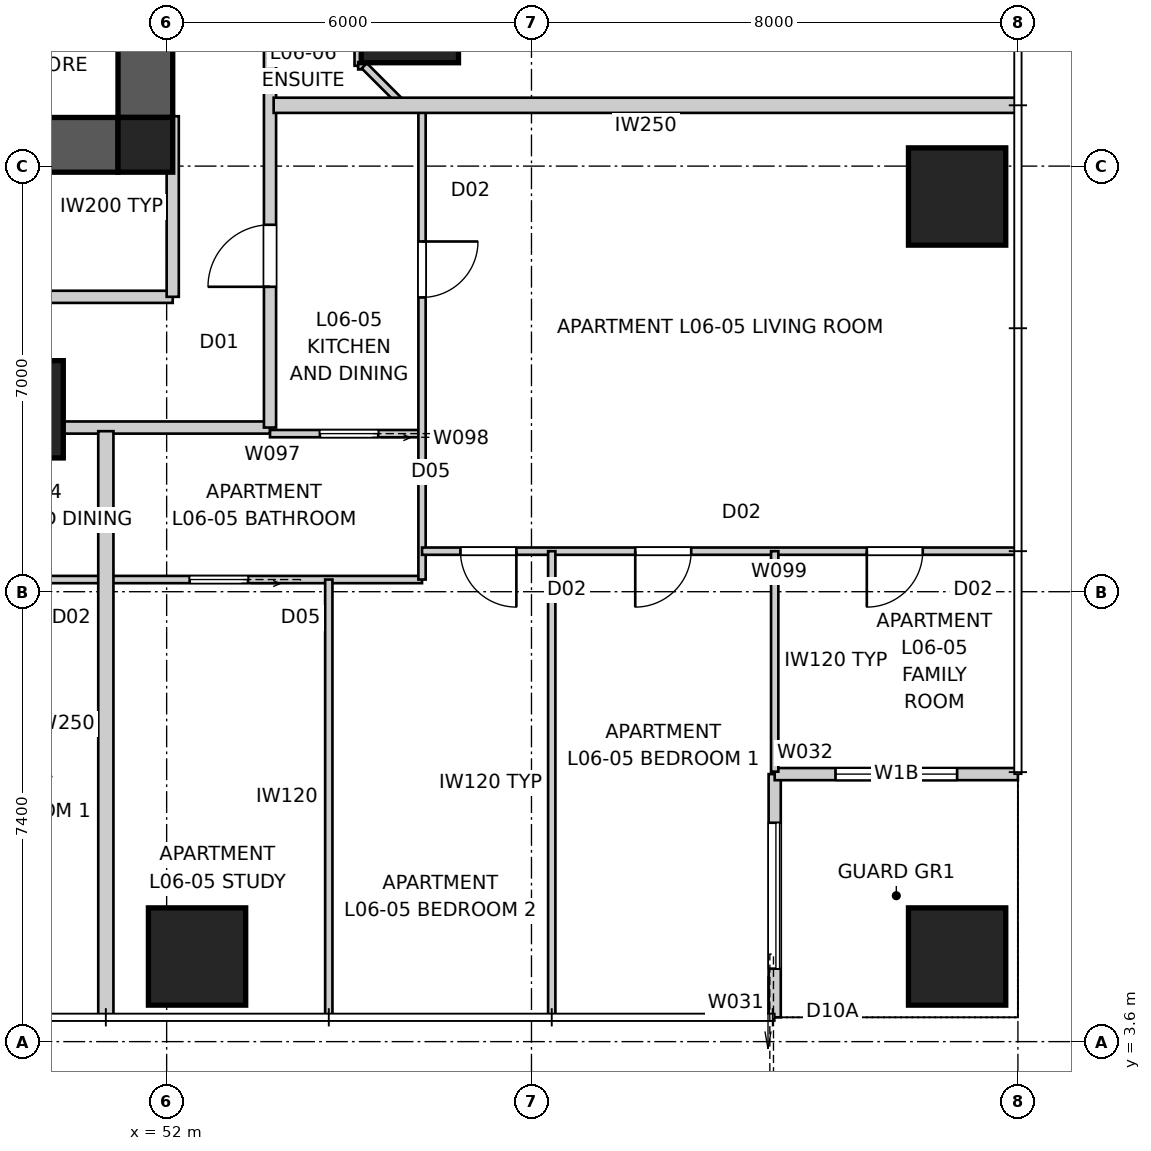
"""IFC4 building model, lengths in metres.
Left out: names, types, materials, properties, quantities, classifications, styles, units other than length and angle.
Written with IfcOpenShell. Run it as: python <this file> out.ifc"""

import sys

from ifc_helpers import new_model, si_unit, direction, frame, frame_2d, origin, origin_2d, place, context, subcontext, project, spatial, polyline, rectangle, outline, extrude, element, fill, save


model = new_model("IFC4")
c1 = context("Model", 3, precision=1e-05, world=origin(), true_north=direction((0.0, 1.0)))
c2 = subcontext(c1, "Body", "Model", "MODEL_VIEW")
j1 = project(units=[si_unit("LENGTHUNIT", "METRE"), si_unit("PLANEANGLEUNIT", "RADIAN")], contexts=[c1])
p1 = place(None, origin())
s1 = spatial("IfcSite", under=j1, at=p1, CompositionType="ELEMENT")
p2 = place(p1, origin())
s2 = spatial("IfcBuilding", under=s1, at=p2, CompositionType="ELEMENT")
p3 = place(p2, frame((0.0, 0.0, 25.2)))
s3 = spatial("IfcBuildingStorey", under=s2, at=p3, CompositionType="ELEMENT", Elevation=25.2)
p4 = place(p3, frame((51.2, 18.35, 0.0), z_axis=(0.0, 0.0, 1.0), x_axis=(-1.0, 0.0, 0.0)))
e1 = element("IfcWall", 1, at=p4, inside=s3, PredefinedType="SHEAR", context=c2, shape_type="SweptSolid", body=[
    extrude(outline(polyline([(0.0, -0.45), (22.4, -0.45), (22.4, -0.025), (22.85, -0.025), (22.85, 0.025), (22.4, 0.025), (22.4, 0.45), (0.0, 0.45), (0.0, 0.025), (-0.45, 0.025), (-0.45, -0.025), (0.0, -0.025), (0.0, -0.45)])), origin(), (0.0, 0.0, 1.0), 3.4),
])
p5 = place(p3, frame((51.65, 18.8, 0.0), z_axis=(0.0, 0.0, 1.0), x_axis=(0.0, 1.0, 0.0)))
e2 = element("IfcWall", 2, at=p5, inside=s3, PredefinedType="SHEAR", context=c2, shape_type="SweptSolid", body=[
    extrude(outline(polyline([(0.0, -0.45), (22.4, -0.45), (22.4, -0.025), (22.85, -0.025), (22.85, 0.025), (22.4, 0.025), (22.4, 0.45), (0.0, 0.45), (0.0, 0.025), (-0.45, 0.025), (-0.45, -0.025), (0.0, -0.025), (0.0, -0.45)])), origin(), (0.0, 0.0, 1.0), 3.4),
])
p6 = place(p5, frame((11.14, 0.0, 0.0)))
e3 = element("IfcOpeningElement", 3, at=p6, cuts=e2, PredefinedType="OPENING", context=c2, shape_type="SweptSolid", body=[
    extrude(rectangle(XDim=1.02, YDim=2.4, at=frame_2d((0.51, 1.2))), frame((0.0, 0.46, 0.0), z_axis=(0.0, -1.0, 0.0), x_axis=(1.0, 0.0, 0.0)), (0.0, 0.0, 1.0), 0.92),
])
p7 = place(p3, frame((51.65, 18.35, 0.0), z_axis=(0.0, 0.0, 1.0), x_axis=(1.0, 0.0, 0.0)))
e4 = element("IfcColumn", 4, at=p7, inside=s3, PredefinedType="COLUMN", context=c2, shape_type="SweptSolid", body=[
    extrude(rectangle(XDim=0.9, YDim=0.9, at=origin_2d()), origin(), (0.0, 0.0, 1.0), 3.4),
])
for number, where, z_axis, x_axis in (
    (5, (52.5, 5.0, 0.0), (0.0, 0.0, 1.0), (1.0, 0.0, 0.0)),
    (6, (65.0, 5.0, 0.0), (0.0, 0.0, 1.0), (1.0, 0.0, 0.0)),
    (7, (65.0, 17.5, 0.0), (0.0, 0.0, 1.0), (1.0, 0.0, 0.0)),
    (8, (49.5, 14.0, 0.0), (0.0, 0.0, 1.0), (1.0, 0.0, 0.0)),
    (9, (56.0, 20.5, 0.0), (0.0, 0.0, 1.0), (1.0, 0.0, 0.0)),
):
    element("IfcColumn", number, at=place(p3, frame(where, z_axis=z_axis, x_axis=x_axis)), inside=s3, PredefinedType="COLUMN", context=c2, shape_type="SweptSolid", body=[
        extrude(rectangle(XDim=1.6, YDim=1.6, at=origin_2d()), origin(), (0.0, 0.0, 1.0), 3.4),
    ])
p8 = place(p3, frame((62.0, 4.0, 0.0), z_axis=(0.0, 0.0, 1.0), x_axis=(0.0, 1.0, 0.0)))
e10 = element("IfcWall", 10, at=p8, inside=s3, PredefinedType="SOLIDWALL", context=c2, shape_type="SweptSolid", body=[
    extrude(rectangle(XDim=4.0, YDim=0.2, at=frame_2d((2.0, 0.0))), origin(), (0.0, 0.0, 1.0), 3.25),
])
p9 = place(p8, frame((0.8, 0.0, 0.0)))
e11 = element("IfcOpeningElement", 11, at=p9, cuts=e10, PredefinedType="OPENING", context=c2, shape_type="SweptSolid", body=[
    extrude(rectangle(XDim=2.4, YDim=2.1, at=frame_2d((1.2, 1.05))), frame((0.0, 0.11, 0.0), z_axis=(0.0, -1.0, 0.0), x_axis=(1.0, 0.0, 0.0)), (0.0, 0.0, 1.0), 0.22),
])
p10 = place(p3, frame((62.0, 8.0, 0.0), z_axis=(0.0, 0.0, 1.0), x_axis=(1.0, 0.0, 0.0)))
e12 = element("IfcWall", 12, at=p10, inside=s3, PredefinedType="SOLIDWALL", context=c2, shape_type="SweptSolid", body=[
    extrude(rectangle(XDim=4.0, YDim=0.2, at=frame_2d((2.0, 0.0))), origin(), (0.0, 0.0, 1.0), 3.25),
])
p11 = place(p10, frame((1.0, 0.0, 0.45)))
e13 = element("IfcOpeningElement", 13, at=p11, cuts=e12, PredefinedType="OPENING", context=c2, shape_type="SweptSolid", body=[
    extrude(rectangle(XDim=2.0, YDim=1.8, at=frame_2d((1.0, 0.9))), frame((0.0, 0.11, 0.0), z_axis=(0.0, -1.0, 0.0), x_axis=(1.0, 0.0, 0.0)), (0.0, 0.0, 1.0), 0.22),
])
p12 = place(p3, frame((49.242, 13.7, 0.0), z_axis=(0.0, 0.0, 1.0), x_axis=(1.0, 0.0, 0.0)))
e14 = element("IfcWall", 14, at=p12, inside=s3, PredefinedType="PARTITIONING", context=c2, shape_type="SweptSolid", body=[
    extrude(rectangle(XDim=4.458, YDim=0.2, at=frame_2d((2.229, 0.0))), origin(), (0.0, 0.0, 1.0), 3.25),
])
p13 = place(p3, frame((53.7, 13.7, 0.0), z_axis=(0.0, 0.0, 1.0), x_axis=(0.0, 1.0, 0.0)))
e15 = element("IfcWall", 15, at=p13, inside=s3, PredefinedType="PARTITIONING", context=c2, shape_type="SweptSolid", body=[
    extrude(rectangle(XDim=32.6, YDim=0.2, at=frame_2d((16.3, 0.0))), origin(), (0.0, 0.0, 1.0), 3.25),
])
p14 = place(p13, frame((2.315, 0.0, 0.0)))
e16 = element("IfcOpeningElement", 16, at=p14, cuts=e15, PredefinedType="OPENING", context=c2, shape_type="SweptSolid", body=[
    extrude(rectangle(XDim=1.02, YDim=2.34, at=frame_2d((0.51, 1.17))), frame((0.0, 0.11, 0.0), z_axis=(0.0, -1.0, 0.0), x_axis=(1.0, 0.0, 0.0)), (0.0, 0.0, 1.0), 0.22),
])
p15 = place(p13, frame((29.265, 0.0, 0.0)))
e17 = element("IfcOpeningElement", 17, at=p15, cuts=e15, PredefinedType="OPENING", context=c2, shape_type="SweptSolid", body=[
    extrude(rectangle(XDim=1.02, YDim=2.34, at=frame_2d((0.51, 1.17))), frame((0.0, 0.11, 0.0), z_axis=(0.0, -1.0, 0.0), x_axis=(1.0, 0.0, 0.0)), (0.0, 0.0, 1.0), 0.22),
])
p16 = place(p13, frame((20.646, 0.0, 0.0)))
e18 = element("IfcOpeningElement", 18, at=p16, cuts=e15, PredefinedType="OPENING", context=c2, shape_type="SweptSolid", body=[
    extrude(rectangle(XDim=1.02, YDim=2.34, at=frame_2d((0.51, 1.17))), frame((0.0, 0.11, 0.0), z_axis=(0.0, -1.0, 0.0), x_axis=(1.0, 0.0, 0.0)), (0.0, 0.0, 1.0), 0.22),
])
p17 = place(p13, frame((13.626, 0.0, 0.0)))
e19 = element("IfcOpeningElement", 19, at=p17, cuts=e15, PredefinedType="OPENING", context=c2, shape_type="SweptSolid", body=[
    extrude(rectangle(XDim=1.02, YDim=2.34, at=frame_2d((0.51, 1.17))), frame((0.0, 0.11, 0.0), z_axis=(0.0, -1.0, 0.0), x_axis=(1.0, 0.0, 0.0)), (0.0, 0.0, 1.0), 0.22),
])
p18 = place(p3, frame((51.0, 4.0, 0.0), z_axis=(0.0, 0.0, 1.0), x_axis=(0.0, 1.0, 0.0)))
e20 = element("IfcWall", 20, at=p18, inside=s3, PredefinedType="PARTITIONING", context=c2, shape_type="SweptSolid", body=[
    extrude(rectangle(XDim=9.64, YDim=0.25, at=frame_2d((4.82, 0.0))), origin(), (0.0, 0.0, 1.0), 3.25),
])
p19 = place(p3, frame((66.0, 19.0, 0.0), z_axis=(0.0, 0.0, 1.0), x_axis=(-1.0, 0.0, 0.0)))
e21 = element("IfcWall", 21, at=p19, inside=s3, PredefinedType="PARTITIONING", context=c2, shape_type="SweptSolid", body=[
    extrude(rectangle(XDim=12.24, YDim=0.25, at=frame_2d((6.12, 0.0))), origin(), (0.0, 0.0, 1.0), 3.25),
])
p20 = place(p3, frame((27.9, 15.85, 0.0), z_axis=(0.0, 0.0, 1.0), x_axis=(1.0, 0.0, 0.0)))
e22 = element("IfcWall", 22, at=p20, inside=s3, PredefinedType="PARTITIONING", context=c2, shape_type="SweptSolid", body=[
    extrude(rectangle(XDim=24.2, YDim=0.2, at=frame_2d((12.1, 0.0))), origin(), (0.0, 0.0, 1.0), 3.25),
])
p21 = place(p20, frame((12.437, 0.0, 0.0)))
e23 = element("IfcOpeningElement", 23, at=p21, cuts=e22, PredefinedType="OPENING", context=c2, shape_type="SweptSolid", body=[
    extrude(rectangle(XDim=1.02, YDim=2.1, at=frame_2d((0.51, 1.05))), frame((0.0, 0.11, 0.0), z_axis=(0.0, -1.0, 0.0), x_axis=(1.0, 0.0, 0.0)), (0.0, 0.0, 1.0), 0.22),
])
p22 = place(p20, frame((3.544, 0.0, 0.0)))
e24 = element("IfcOpeningElement", 24, at=p22, cuts=e22, PredefinedType="OPENING", context=c2, shape_type="SweptSolid", body=[
    extrude(rectangle(XDim=1.02, YDim=2.1, at=frame_2d((0.51, 1.05))), frame((0.0, 0.11, 0.0), z_axis=(0.0, -1.0, 0.0), x_axis=(1.0, 0.0, 0.0)), (0.0, 0.0, 1.0), 0.22),
])
p23 = place(p20, frame((19.733, 0.0, 0.0)))
e25 = element("IfcOpeningElement", 25, at=p23, cuts=e22, PredefinedType="OPENING", context=c2, shape_type="SweptSolid", body=[
    extrude(rectangle(XDim=1.02, YDim=2.1, at=frame_2d((0.51, 1.05))), frame((0.0, 0.11, 0.0), z_axis=(0.0, -1.0, 0.0), x_axis=(1.0, 0.0, 0.0)), (0.0, 0.0, 1.0), 0.22),
])
p24 = place(p3, frame((52.1, 15.85, 0.0), z_axis=(0.0, 0.0, 1.0), x_axis=(0.0, 1.0, 0.0)))
e26 = element("IfcWall", 26, at=p24, inside=s3, PredefinedType="PARTITIONING", context=c2, shape_type="SweptSolid", body=[
    extrude(rectangle(XDim=2.97, YDim=0.2, at=frame_2d((1.485, 0.0))), origin(), (0.0, 0.0, 1.0), 3.25),
])
p25 = place(p3, frame((56.2, 11.2, 0.0), z_axis=(0.0, 0.0, 1.0), x_axis=(-1.0, 0.0, 0.0)))
e27 = element("IfcWall", 27, at=p25, inside=s3, PredefinedType="PARTITIONING", context=c2, shape_type="SweptSolid", body=[
    extrude(rectangle(XDim=32.4, YDim=0.12, at=frame_2d((16.2, 0.0))), origin(), (0.0, 0.0, 1.0), 3.25),
])
p26 = place(p25, frame((24.882, 0.0, 0.0)))
e28 = element("IfcOpeningElement", 28, at=p26, cuts=e27, PredefinedType="OPENING", context=c2, shape_type="SweptSolid", body=[
    extrude(rectangle(XDim=0.92, YDim=2.34, at=frame_2d((0.46, 1.17))), frame((0.0, 0.07, 0.0), z_axis=(0.0, -1.0, 0.0), x_axis=(1.0, 0.0, 0.0)), (0.0, 0.0, 1.0), 0.14),
])
p27 = place(p25, frame((22.477, 0.0, 0.0)))
e29 = element("IfcOpeningElement", 29, at=p27, cuts=e27, PredefinedType="OPENING", context=c2, shape_type="SweptSolid", body=[
    extrude(rectangle(XDim=0.92, YDim=2.34, at=frame_2d((0.46, 1.17))), frame((0.0, 0.07, 0.0), z_axis=(0.0, -1.0, 0.0), x_axis=(1.0, 0.0, 0.0)), (0.0, 0.0, 1.0), 0.14),
])
p28 = place(p25, frame((6.598, 0.0, 0.0)))
e30 = element("IfcOpeningElement", 30, at=p28, cuts=e27, PredefinedType="OPENING", context=c2, shape_type="SweptSolid", body=[
    extrude(rectangle(XDim=0.92, YDim=2.34, at=frame_2d((0.46, 1.17))), frame((0.0, 0.07, 0.0), z_axis=(0.0, -1.0, 0.0), x_axis=(1.0, 0.0, 0.0)), (0.0, 0.0, 1.0), 0.14),
])
p29 = place(p25, frame((28.598, 0.0, 0.0)))
e31 = element("IfcOpeningElement", 31, at=p29, cuts=e27, PredefinedType="OPENING", context=c2, shape_type="SweptSolid", body=[
    extrude(rectangle(XDim=0.92, YDim=2.34, at=frame_2d((0.46, 1.17))), frame((0.0, 0.07, 0.0), z_axis=(0.0, -1.0, 0.0), x_axis=(1.0, 0.0, 0.0)), (0.0, 0.0, 1.0), 0.14),
])
p30 = place(p25, frame((2.862, 0.0, 0.0)))
e32 = element("IfcOpeningElement", 32, at=p30, cuts=e27, PredefinedType="OPENING", context=c2, shape_type="SweptSolid", body=[
    extrude(rectangle(XDim=0.96, YDim=2.1, at=frame_2d((0.48, 1.05))), frame((0.0, 0.07, 0.0), z_axis=(0.0, -1.0, 0.0), x_axis=(1.0, 0.0, 0.0)), (0.0, 0.0, 1.0), 0.14),
])
p31 = place(p25, frame((10.363, 0.0, 0.0)))
e33 = element("IfcOpeningElement", 33, at=p31, cuts=e27, PredefinedType="OPENING", context=c2, shape_type="SweptSolid", body=[
    extrude(rectangle(XDim=0.96, YDim=2.1, at=frame_2d((0.48, 1.05))), frame((0.0, 0.07, 0.0), z_axis=(0.0, -1.0, 0.0), x_axis=(1.0, 0.0, 0.0)), (0.0, 0.0, 1.0), 0.14),
])
p32 = place(p25, frame((13.862, 0.0, 0.0)))
e34 = element("IfcOpeningElement", 34, at=p32, cuts=e27, PredefinedType="OPENING", context=c2, shape_type="SweptSolid", body=[
    extrude(rectangle(XDim=0.96, YDim=2.1, at=frame_2d((0.48, 1.05))), frame((0.0, 0.07, 0.0), z_axis=(0.0, -1.0, 0.0), x_axis=(1.0, 0.0, 0.0)), (0.0, 0.0, 1.0), 0.14),
])
p33 = place(p25, frame((17.529, 0.0, 0.0)))
e35 = element("IfcOpeningElement", 35, at=p33, cuts=e27, PredefinedType="OPENING", context=c2, shape_type="SweptSolid", body=[
    extrude(rectangle(XDim=0.96, YDim=2.1, at=frame_2d((0.48, 1.05))), frame((0.0, 0.07, 0.0), z_axis=(0.0, -1.0, 0.0), x_axis=(1.0, 0.0, 0.0)), (0.0, 0.0, 1.0), 0.14),
])
p34 = place(p3, frame((56.2, 13.6, 0.0), z_axis=(0.0, 0.0, 1.0), x_axis=(-1.0, 0.0, 0.0)))
e36 = element("IfcWall", 36, at=p34, inside=s3, PredefinedType="PARTITIONING", context=c2, shape_type="SweptSolid", body=[
    extrude(rectangle(XDim=2.5, YDim=0.12, at=frame_2d((1.25, 0.0))), origin(), (0.0, 0.0, 1.0), 3.25),
])
p35 = place(p34, frame((0.72, 0.0, 0.0)))
e37 = element("IfcOpeningElement", 37, at=p35, cuts=e36, PredefinedType="OPENING", context=c2, shape_type="SweptSolid", body=[
    extrude(rectangle(XDim=0.96, YDim=2.1, at=frame_2d((0.48, 1.05))), frame((0.0, 0.07, 0.0), z_axis=(0.0, -1.0, 0.0), x_axis=(1.0, 0.0, 0.0)), (0.0, 0.0, 1.0), 0.14),
])
p36 = place(p3, frame((56.2, 19.0, 0.0), z_axis=(0.0, 0.0, 1.0), x_axis=(0.0, -1.0, 0.0)))
e38 = element("IfcWall", 38, at=p36, inside=s3, PredefinedType="PARTITIONING", context=c2, shape_type="SweptSolid", body=[
    extrude(rectangle(XDim=7.8, YDim=0.12, at=frame_2d((3.9, 0.0))), origin(), (0.0, 0.0, 1.0), 3.25),
])
p37 = place(p36, frame((2.24, 0.0, 0.0)))
e39 = element("IfcOpeningElement", 39, at=p37, cuts=e38, PredefinedType="OPENING", context=c2, shape_type="SweptSolid", body=[
    extrude(rectangle(XDim=0.92, YDim=2.34, at=frame_2d((0.46, 1.17))), frame((0.0, 0.07, 0.0), z_axis=(0.0, -1.0, 0.0), x_axis=(1.0, 0.0, 0.0)), (0.0, 0.0, 1.0), 0.14),
])
p38 = place(p3, frame((65.96, 11.667, 0.0), z_axis=(0.0, 0.0, 1.0), x_axis=(-1.0, 0.0, 0.0)))
e40 = element("IfcWall", 40, at=p38, inside=s3, PredefinedType="PARTITIONING", context=c2, shape_type="SweptSolid", body=[
    extrude(rectangle(XDim=9.76, YDim=0.12, at=frame_2d((4.88, 0.0))), origin(), (0.0, 0.0, 1.0), 3.25),
])
p39 = place(p38, frame((1.525, 0.0, 0.0)))
e41 = element("IfcOpeningElement", 41, at=p39, cuts=e40, PredefinedType="OPENING", context=c2, shape_type="SweptSolid", body=[
    extrude(rectangle(XDim=0.92, YDim=2.34, at=frame_2d((0.46, 1.17))), frame((0.0, 0.07, 0.0), z_axis=(0.0, -1.0, 0.0), x_axis=(1.0, 0.0, 0.0)), (0.0, 0.0, 1.0), 0.14),
])
p40 = place(p38, frame((5.333, 0.0, 0.0)))
e42 = element("IfcOpeningElement", 42, at=p40, cuts=e40, PredefinedType="OPENING", context=c2, shape_type="SweptSolid", body=[
    extrude(rectangle(XDim=0.92, YDim=2.34, at=frame_2d((0.46, 1.17))), frame((0.0, 0.07, 0.0), z_axis=(0.0, -1.0, 0.0), x_axis=(1.0, 0.0, 0.0)), (0.0, 0.0, 1.0), 0.14),
])
p41 = place(p38, frame((8.208, 0.0, 0.0)))
e43 = element("IfcOpeningElement", 43, at=p41, cuts=e40, PredefinedType="OPENING", context=c2, shape_type="SweptSolid", body=[
    extrude(rectangle(XDim=0.92, YDim=2.34, at=frame_2d((0.46, 1.17))), frame((0.0, 0.07, 0.0), z_axis=(0.0, -1.0, 0.0), x_axis=(1.0, 0.0, 0.0)), (0.0, 0.0, 1.0), 0.14),
])
p42 = place(p3, frame((58.333, 4.04, 0.0), z_axis=(0.0, 0.0, 1.0), x_axis=(0.0, 1.0, 0.0)))
e44 = element("IfcWall", 44, at=p42, inside=s3, PredefinedType="PARTITIONING", context=c2, shape_type="SweptSolid", body=[
    extrude(rectangle(XDim=7.627, YDim=0.12, at=frame_2d((3.813, 0.0))), origin(), (0.0, 0.0, 1.0), 3.25),
])
p43 = place(p3, frame((62.0, 11.667, 0.0), z_axis=(0.0, 0.0, 1.0), x_axis=(0.0, -1.0, 0.0)))
e45 = element("IfcWall", 45, at=p43, inside=s3, PredefinedType="PARTITIONING", context=c2, shape_type="SweptSolid", body=[
    extrude(rectangle(XDim=3.627, YDim=0.12, at=frame_2d((1.813, 0.0))), origin(), (0.0, 0.0, 1.0), 3.25),
])
p44 = place(p3, frame((54.667, 4.04, 0.0), z_axis=(0.0, 0.0, 1.0), x_axis=(0.0, 1.0, 0.0)))
e46 = element("IfcWall", 46, at=p44, inside=s3, PredefinedType="PARTITIONING", context=c2, shape_type="SweptSolid", body=[
    extrude(rectangle(XDim=7.16, YDim=0.12, at=frame_2d((3.58, 0.0))), origin(), (0.0, 0.0, 1.0), 2.637),
])
p45 = place(p3, frame((55.15, 21.35, 0.0), z_axis=(0.0, 0.0, 1.0), x_axis=(0.0, -1.0, 0.0)))
e47 = element("IfcWall", 47, at=p45, inside=s3, PredefinedType="PARTITIONING", context=c2, shape_type="SweptSolid", body=[
    extrude(rectangle(XDim=1.7, YDim=0.12, at=frame_2d((0.85, 0.0))), origin(), (0.0, 0.0, 1.0), 3.25),
])
p46 = place(p3, frame((55.25, 19.65, 0.0), z_axis=(0.0, 0.0, 1.0), x_axis=(0.707106781187, -0.707106781187, 0.0)))
e48 = element("IfcWall", 48, at=p46, inside=s3, PredefinedType="PARTITIONING", context=c2, shape_type="SweptSolid", body=[
    extrude(rectangle(XDim=0.919, YDim=0.12, at=frame_2d((0.459, 0.0))), origin(), (0.0, 0.0, 1.0), 3.25),
])
p47 = place(p3, frame((55.15, 19.65, 0.0), z_axis=(0.0, 0.0, 1.0), x_axis=(1.0, 0.0, 0.0)))
e49 = element("IfcWall", 49, at=p47, inside=s3, PredefinedType="PARTITIONING", context=c2, shape_type="SweptSolid", body=[
    extrude(rectangle(XDim=0.1, YDim=0.12, at=frame_2d((0.05, 0.0))), origin(), (0.0, 0.0, 1.0), 3.25),
])
p48 = place(p9, origin())
e50 = element("IfcDoor", 50, at=p48, inside=s3, OperationType="SLIDING_TO_LEFT", PredefinedType="DOOR", context=c2, shape_type="SweptSolid", body=[
    extrude(rectangle(XDim=2.4, YDim=2.1, at=frame_2d((1.2, 1.05))), frame((0.0, 0.025, 0.0), z_axis=(0.0, -1.0, 0.0), x_axis=(1.0, 0.0, 0.0)), (0.0, 0.0, 1.0), 0.05),
])
fill(e11, e50)
p49 = place(p11, origin())
e51 = element("IfcWindow", 51, at=p49, inside=s3, PartitioningType="SINGLE_PANEL", PredefinedType="WINDOW", context=c2, shape_type="SweptSolid", body=[
    extrude(rectangle(XDim=2.0, YDim=1.8, at=frame_2d((1.0, 0.9))), frame((0.0, 0.03, 0.0), z_axis=(0.0, -1.0, 0.0), x_axis=(1.0, 0.0, 0.0)), (0.0, 0.0, 1.0), 0.06),
])
fill(e13, e51)
p50 = place(p14, origin())
e52 = element("IfcDoor", 52, at=p50, inside=s3, OperationType="SINGLE_SWING_LEFT", PredefinedType="DOOR", context=c2, shape_type="SweptSolid", body=[
    extrude(rectangle(XDim=1.02, YDim=2.34, at=frame_2d((0.51, 1.17))), frame((0.0, 0.025, 0.0), z_axis=(0.0, -1.0, 0.0), x_axis=(1.0, 0.0, 0.0)), (0.0, 0.0, 1.0), 0.05),
])
fill(e16, e52)
p51 = place(p37, origin())
e53 = element("IfcDoor", 53, at=p51, inside=s3, OperationType="SINGLE_SWING_LEFT", PredefinedType="DOOR", context=c2, shape_type="SweptSolid", body=[
    extrude(rectangle(XDim=0.92, YDim=2.34, at=frame_2d((0.46, 1.17))), frame((0.0, 0.025, 0.0), z_axis=(0.0, -1.0, 0.0), x_axis=(1.0, 0.0, 0.0)), (0.0, 0.0, 1.0), 0.05),
])
fill(e39, e53)
p52 = place(p35, origin())
e54 = element("IfcDoor", 54, at=p52, inside=s3, OperationType="SLIDING_TO_LEFT", PredefinedType="DOOR", context=c2, shape_type="SweptSolid", body=[
    extrude(rectangle(XDim=0.96, YDim=2.1, at=frame_2d((0.48, 1.05))), frame((0.0, 0.025, 0.0), z_axis=(0.0, -1.0, 0.0), x_axis=(1.0, 0.0, 0.0)), (0.0, 0.0, 1.0), 0.05),
])
fill(e37, e54)
p53 = place(p39, origin())
e55 = element("IfcDoor", 55, at=p53, inside=s3, OperationType="SINGLE_SWING_RIGHT", PredefinedType="DOOR", context=c2, shape_type="SweptSolid", body=[
    extrude(rectangle(XDim=0.92, YDim=2.34, at=frame_2d((0.46, 1.17))), frame((0.0, 0.025, 0.0), z_axis=(0.0, -1.0, 0.0), x_axis=(1.0, 0.0, 0.0)), (0.0, 0.0, 1.0), 0.05),
])
fill(e41, e55)
p54 = place(p40, origin())
e56 = element("IfcDoor", 56, at=p54, inside=s3, OperationType="SINGLE_SWING_RIGHT", PredefinedType="DOOR", context=c2, shape_type="SweptSolid", body=[
    extrude(rectangle(XDim=0.92, YDim=2.34, at=frame_2d((0.46, 1.17))), frame((0.0, 0.025, 0.0), z_axis=(0.0, -1.0, 0.0), x_axis=(1.0, 0.0, 0.0)), (0.0, 0.0, 1.0), 0.05),
])
fill(e42, e56)
p55 = place(p41, origin())
e57 = element("IfcDoor", 57, at=p55, inside=s3, OperationType="SINGLE_SWING_LEFT", PredefinedType="DOOR", context=c2, shape_type="SweptSolid", body=[
    extrude(rectangle(XDim=0.92, YDim=2.34, at=frame_2d((0.46, 1.17))), frame((0.0, 0.025, 0.0), z_axis=(0.0, -1.0, 0.0), x_axis=(1.0, 0.0, 0.0)), (0.0, 0.0, 1.0), 0.05),
])
fill(e43, e57)
p56 = place(p30, origin())
e58 = element("IfcDoor", 58, at=p56, inside=s3, OperationType="SLIDING_TO_LEFT", PredefinedType="DOOR", context=c2, shape_type="SweptSolid", body=[
    extrude(rectangle(XDim=0.96, YDim=2.1, at=frame_2d((0.48, 1.05))), frame((0.0, 0.025, 0.0), z_axis=(0.0, -1.0, 0.0), x_axis=(1.0, 0.0, 0.0)), (0.0, 0.0, 1.0), 0.05),
])
fill(e32, e58)
save(model, sys.argv[1])
